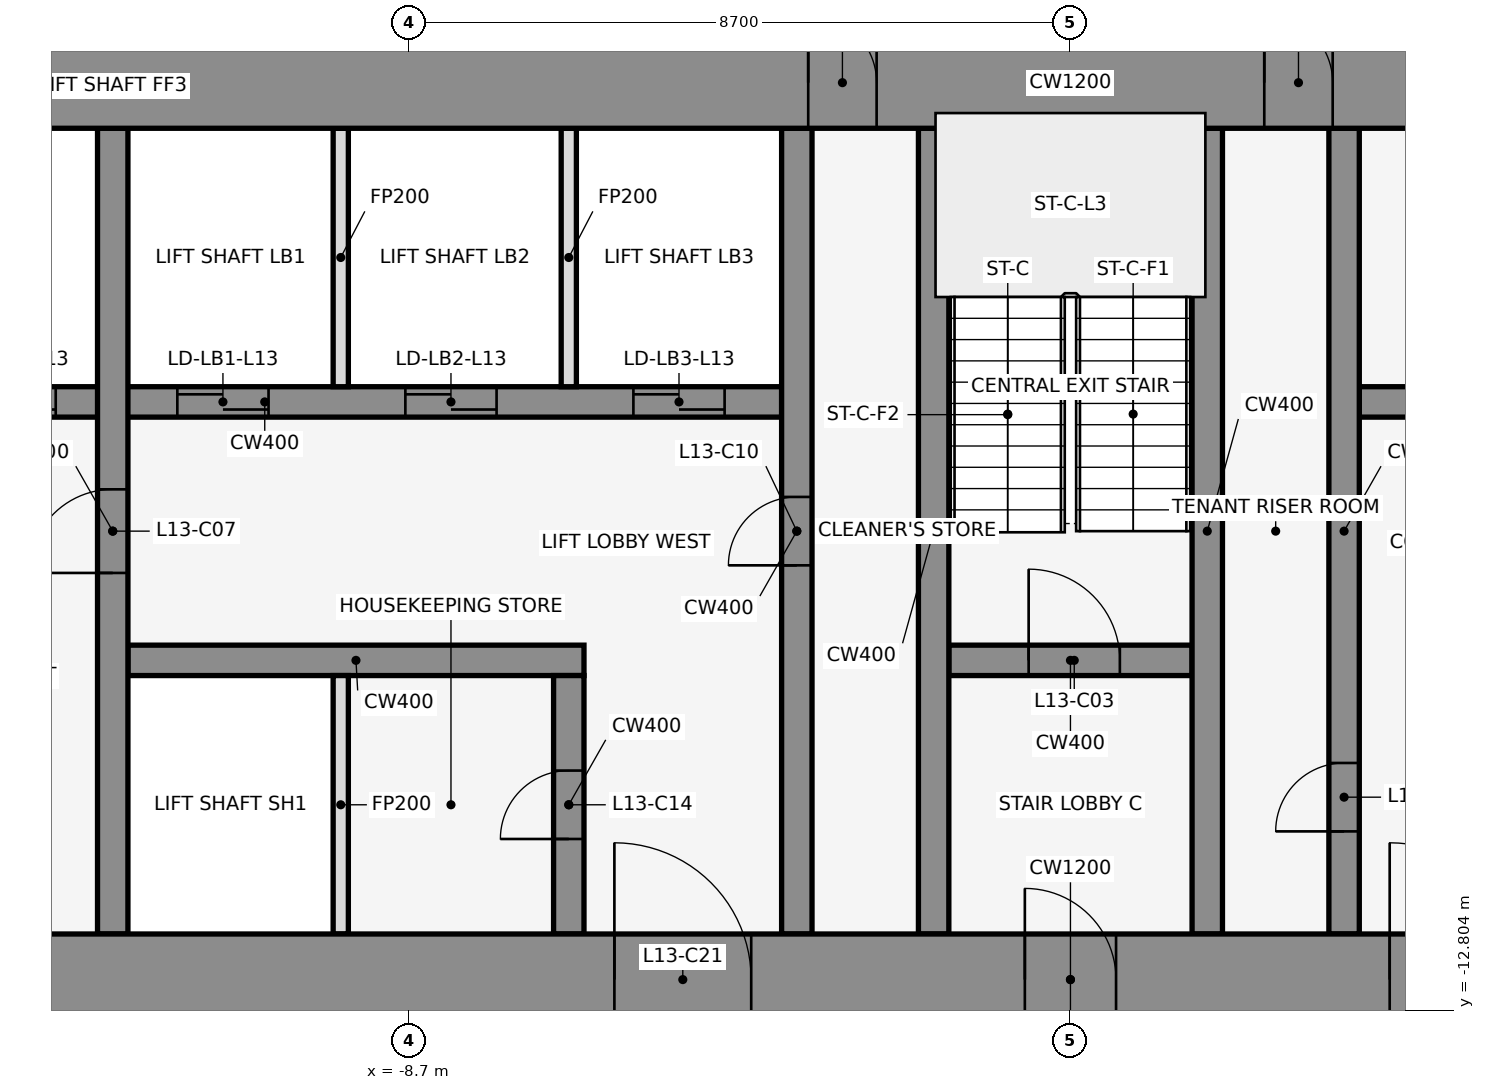
"""IFC4 building model, lengths in metres.
Left out: names, types, materials, properties, quantities, classifications, styles, units other than length and angle.
Written with IfcOpenShell. Run it as: python <this file> out.ifc"""

import sys

from ifc_helpers import new_model, si_unit, direction, frame, frame_2d, origin, place, context, subcontext, project, spatial, rectangle, extrude, element, fill, save


model = new_model("IFC4")
c1 = context("Model", 3, precision=1e-05, world=origin(), true_north=direction((0.0, 1.0)))
c2 = subcontext(c1, "Body", "Model", "MODEL_VIEW")
j1 = project(units=[si_unit("LENGTHUNIT", "METRE"), si_unit("PLANEANGLEUNIT", "RADIAN")], contexts=[c1])
p1 = place(None, origin())
s1 = spatial("IfcSite", under=j1, at=p1, CompositionType="ELEMENT")
p2 = place(p1, origin())
s2 = spatial("IfcBuilding", under=s1, at=p2, CompositionType="ELEMENT")
p3 = place(p2, frame((0.0, 0.0, 66.5)))
s3 = spatial("IfcBuildingStorey", under=s2, at=p3, CompositionType="ELEMENT", Elevation=66.5)
for number, where, z_axis, x_axis in (
    (1, (1.901, 1.08, 0.0), (0.0, 0.0, 1.0), (-0.84, -0.543, 0.0)),
    (2, (-0.068, -0.105, 0.0), (0.0, 0.0, 1.0), (-0.84, 0.543, 0.0)),
):
    element("IfcWall", number, at=place(p3, frame(where, z_axis=z_axis, x_axis=x_axis)), inside=s3, PredefinedType="STANDARD", context=c2, shape_type="SweptSolid", body=[
        extrude(rectangle(XDim=2.183, YDim=0.25, at=frame_2d((1.091, 0.0))), origin(), (0.0, 0.0, 1.0), 4.35),
    ])
p4 = place(p3, frame((-12.4, -8.2, 0.0), z_axis=(0.0, 0.0, 1.0), x_axis=(1.0, 0.0, 0.0)))
e3 = element("IfcWall", 3, at=p4, inside=s3, PredefinedType="SHEAR", context=c2, shape_type="SweptSolid", body=[
    extrude(rectangle(XDim=6.0, YDim=0.4, at=frame_2d((3.0, 0.0))), origin(), (0.0, 0.0, 1.0), 4.5),
])
p5 = place(p3, frame((-1.6, -8.2, 0.0), z_axis=(0.0, 0.0, 1.0), x_axis=(1.0, 0.0, 0.0)))
e4 = element("IfcWall", 4, at=p5, inside=s3, PredefinedType="SHEAR", context=c2, shape_type="SweptSolid", body=[
    extrude(rectangle(XDim=3.2, YDim=0.4, at=frame_2d((1.6, 0.0))), origin(), (0.0, 0.0, 1.0), 4.5),
])
p6 = place(p5, frame((1.05, 0.0, 0.0)))
e5 = element("IfcOpeningElement", 5, at=p6, cuts=e4, PredefinedType="OPENING", context=c2, shape_type="SweptSolid", body=[
    extrude(rectangle(XDim=1.2, YDim=2.1, at=frame_2d((0.6, 1.05))), frame((0.0, 0.212, 0.0), z_axis=(0.0, -1.0, 0.0), x_axis=(1.0, 0.0, 0.0)), (0.0, 0.0, 1.0), 0.424),
])
p7 = place(p3, frame((-17.4, -4.8, 0.0), z_axis=(0.0, 0.0, 1.0), x_axis=(1.0, 0.0, 0.0)))
e6 = element("IfcWall", 6, at=p7, inside=s3, PredefinedType="SHEAR", context=c2, shape_type="SweptSolid", body=[
    extrude(rectangle(XDim=13.6, YDim=0.4, at=frame_2d((6.8, 0.0))), origin(), (0.0, 0.0, 1.0), 4.5),
])
p8 = place(p7, frame((0.65, 0.0, 0.0)))
e7 = element("IfcOpeningElement", 7, at=p8, cuts=e6, PredefinedType="OPENING", context=c2, shape_type="SweptSolid", body=[
    extrude(rectangle(XDim=1.1, YDim=2.1, at=frame_2d((0.55, 1.05))), frame((0.0, 0.212, 0.0), z_axis=(0.0, -1.0, 0.0), x_axis=(1.0, 0.0, 0.0)), (0.0, 0.0, 1.0), 0.424),
])
p9 = place(p7, frame((2.95, 0.0, 0.0)))
e8 = element("IfcOpeningElement", 8, at=p9, cuts=e6, PredefinedType="OPENING", context=c2, shape_type="SweptSolid", body=[
    extrude(rectangle(XDim=1.1, YDim=2.1, at=frame_2d((0.55, 1.05))), frame((0.0, 0.212, 0.0), z_axis=(0.0, -1.0, 0.0), x_axis=(1.0, 0.0, 0.0)), (0.0, 0.0, 1.0), 0.424),
])
p10 = place(p7, frame((5.65, 0.0, 0.0)))
e9 = element("IfcOpeningElement", 9, at=p10, cuts=e6, PredefinedType="OPENING", context=c2, shape_type="SweptSolid", body=[
    extrude(rectangle(XDim=1.2, YDim=2.1, at=frame_2d((0.6, 1.05))), frame((0.0, 0.212, 0.0), z_axis=(0.0, -1.0, 0.0), x_axis=(1.0, 0.0, 0.0)), (0.0, 0.0, 1.0), 0.424),
])
p11 = place(p7, frame((8.65, 0.0, 0.0)))
e10 = element("IfcOpeningElement", 10, at=p11, cuts=e6, PredefinedType="OPENING", context=c2, shape_type="SweptSolid", body=[
    extrude(rectangle(XDim=1.2, YDim=2.1, at=frame_2d((0.6, 1.05))), frame((0.0, 0.212, 0.0), z_axis=(0.0, -1.0, 0.0), x_axis=(1.0, 0.0, 0.0)), (0.0, 0.0, 1.0), 0.424),
])
p12 = place(p7, frame((11.65, 0.0, 0.0)))
e11 = element("IfcOpeningElement", 11, at=p12, cuts=e6, PredefinedType="OPENING", context=c2, shape_type="SweptSolid", body=[
    extrude(rectangle(XDim=1.2, YDim=2.1, at=frame_2d((0.6, 1.05))), frame((0.0, 0.212, 0.0), z_axis=(0.0, -1.0, 0.0), x_axis=(1.0, 0.0, 0.0)), (0.0, 0.0, 1.0), 0.424),
])
p13 = place(p3, frame((3.8, -4.8, 0.0), z_axis=(0.0, 0.0, 1.0), x_axis=(1.0, 0.0, 0.0)))
e12 = element("IfcWall", 12, at=p13, inside=s3, PredefinedType="SHEAR", context=c2, shape_type="SweptSolid", body=[
    extrude(rectangle(XDim=13.6, YDim=0.4, at=frame_2d((6.8, 0.0))), origin(), (0.0, 0.0, 1.0), 4.5),
])
p14 = place(p13, frame((9.45, 0.0, 0.0)))
e13 = element("IfcOpeningElement", 13, at=p14, cuts=e12, PredefinedType="OPENING", context=c2, shape_type="SweptSolid", body=[
    extrude(rectangle(XDim=1.1, YDim=2.1, at=frame_2d((0.55, 1.05))), frame((0.0, 0.212, 0.0), z_axis=(0.0, -1.0, 0.0), x_axis=(1.0, 0.0, 0.0)), (0.0, 0.0, 1.0), 0.424),
])
p15 = place(p13, frame((11.85, 0.0, 0.0)))
e14 = element("IfcOpeningElement", 14, at=p15, cuts=e12, PredefinedType="OPENING", context=c2, shape_type="SweptSolid", body=[
    extrude(rectangle(XDim=1.1, YDim=2.1, at=frame_2d((0.55, 1.05))), frame((0.0, 0.212, 0.0), z_axis=(0.0, -1.0, 0.0), x_axis=(1.0, 0.0, 0.0)), (0.0, 0.0, 1.0), 0.424),
])
p16 = place(p13, frame((2.45, 0.0, 0.0)))
e15 = element("IfcOpeningElement", 15, at=p16, cuts=e12, PredefinedType="OPENING", context=c2, shape_type="SweptSolid", body=[
    extrude(rectangle(XDim=0.9, YDim=2.1, at=frame_2d((0.45, 1.05))), frame((0.0, 0.212, 0.0), z_axis=(0.0, -1.0, 0.0), x_axis=(1.0, 0.0, 0.0)), (0.0, 0.0, 1.0), 0.424),
])
p17 = place(p13, frame((6.85, 0.0, 0.0)))
e16 = element("IfcOpeningElement", 16, at=p17, cuts=e12, PredefinedType="OPENING", context=c2, shape_type="SweptSolid", body=[
    extrude(rectangle(XDim=0.9, YDim=2.1, at=frame_2d((0.45, 1.05))), frame((0.0, 0.212, 0.0), z_axis=(0.0, -1.0, 0.0), x_axis=(1.0, 0.0, 0.0)), (0.0, 0.0, 1.0), 0.424),
])
p18 = place(p3, frame((-12.6, -11.8, 0.0), z_axis=(0.0, 0.0, 1.0), x_axis=(0.0, 1.0, 0.0)))
e17 = element("IfcWall", 17, at=p18, inside=s3, PredefinedType="SHEAR", context=c2, shape_type="SweptSolid", body=[
    extrude(rectangle(XDim=10.6, YDim=0.4, at=frame_2d((5.3, 0.0))), origin(), (0.0, 0.0, 1.0), 4.5),
])
p19 = place(p18, frame((4.75, 0.0, 0.0)))
e18 = element("IfcOpeningElement", 18, at=p19, cuts=e17, PredefinedType="OPENING", context=c2, shape_type="SweptSolid", body=[
    extrude(rectangle(XDim=1.1, YDim=2.1, at=frame_2d((0.55, 1.05))), frame((0.0, 0.212, 0.0), z_axis=(0.0, -1.0, 0.0), x_axis=(1.0, 0.0, 0.0)), (0.0, 0.0, 1.0), 0.424),
])
for number, where, z_axis, x_axis in (
    (19, (-9.6, -11.8, 0.0), (0.0, 0.0, 1.0), (0.0, 1.0, 0.0)),
    (20, (-9.6, -4.6, 0.0), (0.0, 0.0, 1.0), (0.0, 1.0, 0.0)),
):
    element("IfcWall", number, at=place(p3, frame(where, z_axis=z_axis, x_axis=x_axis)), inside=s3, PredefinedType="PARTITIONING", context=c2, shape_type="SweptSolid", body=[
        extrude(rectangle(XDim=3.4, YDim=0.2, at=frame_2d((1.7, 0.0))), origin(), (0.0, 0.0, 1.0), 3.418),
    ])
p20 = place(p3, frame((-6.6, -11.8, 0.0), z_axis=(0.0, 0.0, 1.0), x_axis=(0.0, 1.0, 0.0)))
e21 = element("IfcWall", 21, at=p20, inside=s3, PredefinedType="SHEAR", context=c2, shape_type="SweptSolid", body=[
    extrude(rectangle(XDim=3.4, YDim=0.4, at=frame_2d((1.7, 0.0))), origin(), (0.0, 0.0, 1.0), 4.5),
])
p21 = place(p20, frame((1.25, 0.0, 0.0)))
e22 = element("IfcOpeningElement", 22, at=p21, cuts=e21, PredefinedType="OPENING", context=c2, shape_type="SweptSolid", body=[
    extrude(rectangle(XDim=0.9, YDim=2.1, at=frame_2d((0.45, 1.05))), frame((0.0, 0.212, 0.0), z_axis=(0.0, -1.0, 0.0), x_axis=(1.0, 0.0, 0.0)), (0.0, 0.0, 1.0), 0.424),
])
p22 = place(p3, frame((-6.6, -4.6, 0.0), z_axis=(0.0, 0.0, 1.0), x_axis=(0.0, 1.0, 0.0)))
e23 = element("IfcWall", 23, at=p22, inside=s3, PredefinedType="PARTITIONING", context=c2, shape_type="SweptSolid", body=[
    extrude(rectangle(XDim=3.4, YDim=0.2, at=frame_2d((1.7, 0.0))), origin(), (0.0, 0.0, 1.0), 3.418),
])
p23 = place(p3, frame((-3.6, -11.8, 0.0), z_axis=(0.0, 0.0, 1.0), x_axis=(0.0, 1.0, 0.0)))
e24 = element("IfcWall", 24, at=p23, inside=s3, PredefinedType="SHEAR", context=c2, shape_type="SweptSolid", body=[
    extrude(rectangle(XDim=10.6, YDim=0.4, at=frame_2d((5.3, 0.0))), origin(), (0.0, 0.0, 1.0), 4.5),
])
p24 = place(p23, frame((4.85, 0.0, 0.0)))
e25 = element("IfcOpeningElement", 25, at=p24, cuts=e24, PredefinedType="OPENING", context=c2, shape_type="SweptSolid", body=[
    extrude(rectangle(XDim=0.9, YDim=2.1, at=frame_2d((0.45, 1.05))), frame((0.0, 0.212, 0.0), z_axis=(0.0, -1.0, 0.0), x_axis=(1.0, 0.0, 0.0)), (0.0, 0.0, 1.0), 0.424),
])
for number, where, z_axis, x_axis in (
    (26, (-1.8, -11.8, 0.0), (0.0, 0.0, 1.0), (0.0, 1.0, 0.0)),
    (27, (1.8, -11.8, 0.0), (0.0, 0.0, 1.0), (0.0, 1.0, 0.0)),
):
    element("IfcWall", number, at=place(p3, frame(where, z_axis=z_axis, x_axis=x_axis)), inside=s3, PredefinedType="SHEAR", context=c2, shape_type="SweptSolid", body=[
        extrude(rectangle(XDim=10.6, YDim=0.4, at=frame_2d((5.3, 0.0))), origin(), (0.0, 0.0, 1.0), 4.5),
    ])
p25 = place(p3, frame((3.6, -11.8, 0.0), z_axis=(0.0, 0.0, 1.0), x_axis=(0.0, 1.0, 0.0)))
e28 = element("IfcWall", 28, at=p25, inside=s3, PredefinedType="SHEAR", context=c2, shape_type="SweptSolid", body=[
    extrude(rectangle(XDim=10.6, YDim=0.4, at=frame_2d((5.3, 0.0))), origin(), (0.0, 0.0, 1.0), 4.5),
])
p26 = place(p25, frame((1.35, 0.0, 0.0)))
e29 = element("IfcOpeningElement", 29, at=p26, cuts=e28, PredefinedType="OPENING", context=c2, shape_type="SweptSolid", body=[
    extrude(rectangle(XDim=0.9, YDim=2.1, at=frame_2d((0.45, 1.05))), frame((0.0, 0.212, 0.0), z_axis=(0.0, -1.0, 0.0), x_axis=(1.0, 0.0, 0.0)), (0.0, 0.0, 1.0), 0.424),
])
p27 = place(p3, frame((-22.0, -0.6, 0.0), z_axis=(0.0, 0.0, 1.0), x_axis=(1.0, 0.0, 0.0)))
e30 = element("IfcWall", 30, at=p27, inside=s3, PredefinedType="SHEAR", context=c2, shape_type="SweptSolid", body=[
    extrude(rectangle(XDim=44.0, YDim=1.2, at=frame_2d((22.0, 0.0))), origin(), (0.0, 0.0, 1.0), 4.5),
])
p28 = place(p27, frame((18.55, 0.0, 0.0)))
e31 = element("IfcOpeningElement", 31, at=p28, cuts=e30, PredefinedType="OPENING", context=c2, shape_type="SweptSolid", body=[
    extrude(rectangle(XDim=0.9, YDim=2.1, at=frame_2d((0.45, 1.05))), frame((0.0, 0.612, 0.0), z_axis=(0.0, -1.0, 0.0), x_axis=(1.0, 0.0, 0.0)), (0.0, 0.0, 1.0), 1.224),
])
p29 = place(p27, frame((24.55, 0.0, 0.0)))
e32 = element("IfcOpeningElement", 32, at=p29, cuts=e30, PredefinedType="OPENING", context=c2, shape_type="SweptSolid", body=[
    extrude(rectangle(XDim=0.9, YDim=2.1, at=frame_2d((0.45, 1.05))), frame((0.0, 0.612, 0.0), z_axis=(0.0, -1.0, 0.0), x_axis=(1.0, 0.0, 0.0)), (0.0, 0.0, 1.0), 1.224),
])
p30 = place(p3, frame((-22.0, -12.4, 0.0), z_axis=(0.0, 0.0, 1.0), x_axis=(1.0, 0.0, 0.0)))
e33 = element("IfcWall", 33, at=p30, inside=s3, PredefinedType="SHEAR", context=c2, shape_type="SweptSolid", body=[
    extrude(rectangle(XDim=44.0, YDim=1.2, at=frame_2d((22.0, 0.0))), origin(), (0.0, 0.0, 1.0), 4.5),
])
p31 = place(p30, frame((2.2, 0.0, 0.0)))
e34 = element("IfcOpeningElement", 34, at=p31, cuts=e33, PredefinedType="OPENING", context=c2, shape_type="SweptSolid", body=[
    extrude(rectangle(XDim=1.2, YDim=2.1, at=frame_2d((0.6, 1.05))), frame((0.0, 0.612, 0.0), z_axis=(0.0, -1.0, 0.0), x_axis=(1.0, 0.0, 0.0)), (0.0, 0.0, 1.0), 1.224),
])
p32 = place(p30, frame((21.4, 0.0, 0.0)))
e35 = element("IfcOpeningElement", 35, at=p32, cuts=e33, PredefinedType="OPENING", context=c2, shape_type="SweptSolid", body=[
    extrude(rectangle(XDim=1.2, YDim=2.1, at=frame_2d((0.6, 1.05))), frame((0.0, 0.612, 0.0), z_axis=(0.0, -1.0, 0.0), x_axis=(1.0, 0.0, 0.0)), (0.0, 0.0, 1.0), 1.224),
])
p33 = place(p30, frame((40.6, 0.0, 0.0)))
e36 = element("IfcOpeningElement", 36, at=p33, cuts=e33, PredefinedType="OPENING", context=c2, shape_type="SweptSolid", body=[
    extrude(rectangle(XDim=1.2, YDim=2.1, at=frame_2d((0.6, 1.05))), frame((0.0, 0.612, 0.0), z_axis=(0.0, -1.0, 0.0), x_axis=(1.0, 0.0, 0.0)), (0.0, 0.0, 1.0), 1.224),
])
p34 = place(p30, frame((16.0, 0.0, 0.0)))
e37 = element("IfcOpeningElement", 37, at=p34, cuts=e33, PredefinedType="OPENING", context=c2, shape_type="SweptSolid", body=[
    extrude(rectangle(XDim=1.8, YDim=2.1, at=frame_2d((0.9, 1.05))), frame((0.0, 0.612, 0.0), z_axis=(0.0, -1.0, 0.0), x_axis=(1.0, 0.0, 0.0)), (0.0, 0.0, 1.0), 1.224),
])
p35 = place(p30, frame((6.3, 0.0, 0.0)))
e38 = element("IfcOpeningElement", 38, at=p35, cuts=e33, PredefinedType="OPENING", context=c2, shape_type="SweptSolid", body=[
    extrude(rectangle(XDim=1.2, YDim=2.1, at=frame_2d((0.6, 1.05))), frame((0.0, 0.612, 0.0), z_axis=(0.0, -1.0, 0.0), x_axis=(1.0, 0.0, 0.0)), (0.0, 0.0, 1.0), 1.224),
])
p36 = place(p30, frame((26.2, 0.0, 0.0)))
e39 = element("IfcOpeningElement", 39, at=p36, cuts=e33, PredefinedType="OPENING", context=c2, shape_type="SweptSolid", body=[
    extrude(rectangle(XDim=1.8, YDim=2.1, at=frame_2d((0.9, 1.05))), frame((0.0, 0.612, 0.0), z_axis=(0.0, -1.0, 0.0), x_axis=(1.0, 0.0, 0.0)), (0.0, 0.0, 1.0), 1.224),
])
p37 = place(p30, frame((36.5, 0.0, 0.0)))
e40 = element("IfcOpeningElement", 40, at=p37, cuts=e33, PredefinedType="OPENING", context=c2, shape_type="SweptSolid", body=[
    extrude(rectangle(XDim=1.2, YDim=2.1, at=frame_2d((0.6, 1.05))), frame((0.0, 0.612, 0.0), z_axis=(0.0, -1.0, 0.0), x_axis=(1.0, 0.0, 0.0)), (0.0, 0.0, 1.0), 1.224),
])
p38 = place(p6, origin())
e41 = element("IfcDoor", 41, at=p38, inside=s3, OperationType="SINGLE_SWING_LEFT", PredefinedType="DOOR", context=c2, shape_type="SweptSolid", body=[
    extrude(rectangle(XDim=1.2, YDim=2.1, at=frame_2d((0.6, 1.05))), frame((0.0, 0.025, 0.0), z_axis=(0.0, -1.0, 0.0), x_axis=(1.0, 0.0, 0.0)), (0.0, 0.0, 1.0), 0.05),
])
fill(e5, e41)
p39 = place(p9, origin())
e42 = element("IfcDoor", 42, at=p39, inside=s3, OperationType="DOUBLE_DOOR_SLIDING", PredefinedType="DOOR", context=c2, shape_type="SweptSolid", body=[
    extrude(rectangle(XDim=1.1, YDim=2.1, at=frame_2d((0.55, 1.05))), frame((0.0, 0.025, 0.0), z_axis=(0.0, -1.0, 0.0), x_axis=(1.0, 0.0, 0.0)), (0.0, 0.0, 1.0), 0.05),
])
fill(e8, e42)
p40 = place(p10, origin())
e43 = element("IfcDoor", 43, at=p40, inside=s3, OperationType="DOUBLE_DOOR_SLIDING", PredefinedType="DOOR", context=c2, shape_type="SweptSolid", body=[
    extrude(rectangle(XDim=1.2, YDim=2.1, at=frame_2d((0.6, 1.05))), frame((0.0, 0.025, 0.0), z_axis=(0.0, -1.0, 0.0), x_axis=(1.0, 0.0, 0.0)), (0.0, 0.0, 1.0), 0.05),
])
fill(e9, e43)
p41 = place(p11, origin())
e44 = element("IfcDoor", 44, at=p41, inside=s3, OperationType="DOUBLE_DOOR_SLIDING", PredefinedType="DOOR", context=c2, shape_type="SweptSolid", body=[
    extrude(rectangle(XDim=1.2, YDim=2.1, at=frame_2d((0.6, 1.05))), frame((0.0, 0.025, 0.0), z_axis=(0.0, -1.0, 0.0), x_axis=(1.0, 0.0, 0.0)), (0.0, 0.0, 1.0), 0.05),
])
fill(e10, e44)
p42 = place(p12, origin())
e45 = element("IfcDoor", 45, at=p42, inside=s3, OperationType="DOUBLE_DOOR_SLIDING", PredefinedType="DOOR", context=c2, shape_type="SweptSolid", body=[
    extrude(rectangle(XDim=1.2, YDim=2.1, at=frame_2d((0.6, 1.05))), frame((0.0, 0.025, 0.0), z_axis=(0.0, -1.0, 0.0), x_axis=(1.0, 0.0, 0.0)), (0.0, 0.0, 1.0), 0.05),
])
fill(e11, e45)
p43 = place(p19, origin())
e46 = element("IfcDoor", 46, at=p43, inside=s3, OperationType="SINGLE_SWING_LEFT", PredefinedType="DOOR", context=c2, shape_type="SweptSolid", body=[
    extrude(rectangle(XDim=1.1, YDim=2.1, at=frame_2d((0.55, 1.05))), frame((0.0, 0.025, 0.0), z_axis=(0.0, -1.0, 0.0), x_axis=(1.0, 0.0, 0.0)), (0.0, 0.0, 1.0), 0.05),
])
fill(e18, e46)
p44 = place(p24, frame((0.9, 0.0, 0.0), z_axis=(0.0, 0.0, 1.0), x_axis=(-1.0, 0.0, 0.0)))
e47 = element("IfcDoor", 47, at=p44, inside=s3, OperationType="SINGLE_SWING_LEFT", PredefinedType="DOOR", context=c2, shape_type="SweptSolid", body=[
    extrude(rectangle(XDim=0.9, YDim=2.1, at=frame_2d((0.45, 1.05))), frame((0.0, 0.025, 0.0), z_axis=(0.0, -1.0, 0.0), x_axis=(1.0, 0.0, 0.0)), (0.0, 0.0, 1.0), 0.05),
])
fill(e25, e47)
p45 = place(p26, origin())
e48 = element("IfcDoor", 48, at=p45, inside=s3, OperationType="SINGLE_SWING_LEFT", PredefinedType="DOOR", context=c2, shape_type="SweptSolid", body=[
    extrude(rectangle(XDim=0.9, YDim=2.1, at=frame_2d((0.45, 1.05))), frame((0.0, 0.025, 0.0), z_axis=(0.0, -1.0, 0.0), x_axis=(1.0, 0.0, 0.0)), (0.0, 0.0, 1.0), 0.05),
])
fill(e29, e48)
p46 = place(p21, origin())
e49 = element("IfcDoor", 49, at=p46, inside=s3, OperationType="SINGLE_SWING_RIGHT", PredefinedType="DOOR", context=c2, shape_type="SweptSolid", body=[
    extrude(rectangle(XDim=0.9, YDim=2.1, at=frame_2d((0.45, 1.05))), frame((0.0, 0.025, 0.0), z_axis=(0.0, -1.0, 0.0), x_axis=(1.0, 0.0, 0.0)), (0.0, 0.0, 1.0), 0.05),
])
fill(e22, e49)
p47 = place(p28, origin())
e50 = element("IfcDoor", 50, at=p47, inside=s3, OperationType="SINGLE_SWING_LEFT", PredefinedType="DOOR", context=c2, shape_type="SweptSolid", body=[
    extrude(rectangle(XDim=0.9, YDim=2.1, at=frame_2d((0.45, 1.05))), frame((0.0, 0.025, 0.0), z_axis=(0.0, -1.0, 0.0), x_axis=(1.0, 0.0, 0.0)), (0.0, 0.0, 1.0), 0.05),
])
fill(e31, e50)
p48 = place(p29, origin())
e51 = element("IfcDoor", 51, at=p48, inside=s3, OperationType="SINGLE_SWING_LEFT", PredefinedType="DOOR", context=c2, shape_type="SweptSolid", body=[
    extrude(rectangle(XDim=0.9, YDim=2.1, at=frame_2d((0.45, 1.05))), frame((0.0, 0.025, 0.0), z_axis=(0.0, -1.0, 0.0), x_axis=(1.0, 0.0, 0.0)), (0.0, 0.0, 1.0), 0.05),
])
fill(e32, e51)
p49 = place(p32, frame((1.2, 0.0, 0.0), z_axis=(0.0, 0.0, 1.0), x_axis=(-1.0, 0.0, 0.0)))
e52 = element("IfcDoor", 52, at=p49, inside=s3, OperationType="SINGLE_SWING_RIGHT", PredefinedType="DOOR", context=c2, shape_type="SweptSolid", body=[
    extrude(rectangle(XDim=1.2, YDim=2.1, at=frame_2d((0.6, 1.05))), frame((0.0, 0.025, 0.0), z_axis=(0.0, -1.0, 0.0), x_axis=(1.0, 0.0, 0.0)), (0.0, 0.0, 1.0), 0.05),
])
fill(e35, e52)
p50 = place(p34, origin())
e53 = element("IfcDoor", 53, at=p50, inside=s3, OperationType="SINGLE_SWING_LEFT", PredefinedType="DOOR", context=c2, shape_type="SweptSolid", body=[
    extrude(rectangle(XDim=1.8, YDim=2.1, at=frame_2d((0.9, 1.05))), frame((0.0, 0.025, 0.0), z_axis=(0.0, -1.0, 0.0), x_axis=(1.0, 0.0, 0.0)), (0.0, 0.0, 1.0), 0.05),
])
fill(e37, e53)
p51 = place(p36, origin())
e54 = element("IfcDoor", 54, at=p51, inside=s3, OperationType="SINGLE_SWING_LEFT", PredefinedType="DOOR", context=c2, shape_type="SweptSolid", body=[
    extrude(rectangle(XDim=1.8, YDim=2.1, at=frame_2d((0.9, 1.05))), frame((0.0, 0.025, 0.0), z_axis=(0.0, -1.0, 0.0), x_axis=(1.0, 0.0, 0.0)), (0.0, 0.0, 1.0), 0.05),
])
fill(e39, e54)
save(model, sys.argv[1])
